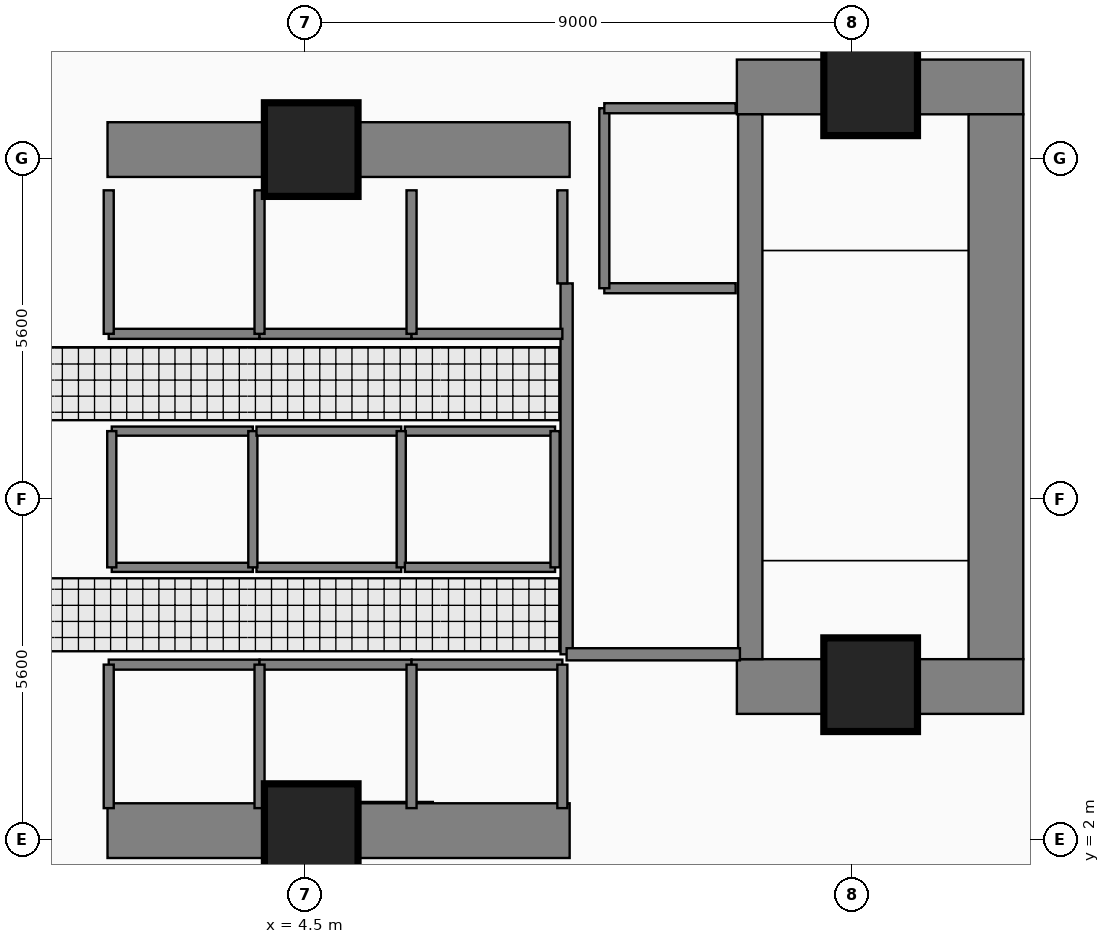
"""IFC4 building model, lengths in metres.
Left out: names, types, materials, properties, quantities, classifications, styles, units other than length and angle.
Written with IfcOpenShell. Run it as: python <this file> out.ifc"""

import sys

from ifc_helpers import new_model, si_unit, direction, frame, frame_2d, origin, origin_2d, place, context, subcontext, project, spatial, rectangle, extrude, element, fill, save


model = new_model("IFC4")
c1 = context("Model", 3, precision=1e-05, world=origin(), true_north=direction((0.0, 1.0)))
c2 = subcontext(c1, "Body", "Model", "MODEL_VIEW")
j1 = project(units=[si_unit("LENGTHUNIT", "METRE"), si_unit("PLANEANGLEUNIT", "RADIAN")], contexts=[c1])
p1 = place(None, origin())
s1 = spatial("IfcSite", under=j1, at=p1, CompositionType="ELEMENT")
p2 = place(p1, origin())
s2 = spatial("IfcBuilding", under=s1, at=p2, CompositionType="ELEMENT")
p3 = place(p2, origin())
s3 = spatial("IfcBuildingStorey", under=s2, at=p3, CompositionType="ELEMENT", Elevation=0.0)
p4 = place(p3, frame((11.6, 14.38, 0.0), z_axis=(0.0, 0.0, 1.0), x_axis=(1.0, 0.0, 0.0)))
e1 = element("IfcWall", 1, at=p4, inside=s3, PredefinedType="SHEAR", context=c2, shape_type="SweptSolid", body=[
    extrude(rectangle(XDim=4.71, YDim=0.9, at=frame_2d((2.355, 0.0))), origin(), (0.0, 0.0, 1.0), 5.81),
])
p5 = place(p3, frame((15.86, 4.97, 0.0), z_axis=(0.0, 0.0, 1.0), x_axis=(0.0, 1.0, 0.0)))
e2 = element("IfcWall", 2, at=p5, inside=s3, PredefinedType="SHEAR", context=c2, shape_type="SweptSolid", body=[
    extrude(rectangle(XDim=8.96, YDim=0.9, at=frame_2d((4.48, 0.0))), origin(), (0.0, 0.0, 1.0), 5.81),
])
p6 = place(p3, frame((11.6, 4.52, 0.0), z_axis=(0.0, 0.0, 1.0), x_axis=(1.0, 0.0, 0.0)))
e3 = element("IfcWall", 3, at=p6, inside=s3, PredefinedType="SHEAR", context=c2, shape_type="SweptSolid", body=[
    extrude(rectangle(XDim=4.71, YDim=0.9, at=frame_2d((2.355, 0.0))), origin(), (0.0, 0.0, 1.0), 5.81),
])
for number, where, z_axis, x_axis in (
    (4, (1.25, 2.15, 0.0), (0.0, 0.0, 1.0), (1.0, 0.0, 0.0)),
    (5, (1.25, 13.35, 0.0), (0.0, 0.0, 1.0), (1.0, 0.0, 0.0)),
):
    element("IfcWall", number, at=place(p3, frame(where, z_axis=z_axis, x_axis=x_axis)), inside=s3, PredefinedType="SHEAR", context=c2, shape_type="SweptSolid", body=[
        extrude(rectangle(XDim=7.6, YDim=0.9, at=frame_2d((3.8, 0.0))), origin(), (0.0, 0.0, 1.0), 5.75),
    ])
p7 = place(p3, frame((11.82, 13.93, 0.0), z_axis=(0.0, 0.0, 1.0), x_axis=(0.0, -1.0, 0.0)))
e6 = element("IfcWall", 6, at=p7, inside=s3, PredefinedType="SHEAR", context=c2, shape_type="SweptSolid", body=[
    extrude(rectangle(XDim=8.96, YDim=0.4, at=frame_2d((4.48, 0.0))), origin(), (0.0, 0.0, 1.0), 5.81),
])
p8 = place(p7, frame((7.53, 0.0, 0.0)))
e7 = element("IfcOpeningElement", 7, at=p8, cuts=e6, PredefinedType="OPENING", context=c2, shape_type="SweptSolid", body=[
    extrude(rectangle(XDim=1.12, YDim=2.22, at=frame_2d((0.56, 1.11))), frame((0.0, 0.21, 0.0), z_axis=(0.0, -1.0, 0.0), x_axis=(1.0, 0.0, 0.0)), (0.0, 0.0, 1.0), 0.42),
])
for number, where, z_axis, x_axis in (
    (8, (4.6, 13.35, 0.0), (0.0, 0.0, 1.0), (1.0, 0.0, 0.0)),
    (9, (13.8, 14.35, 0.0), (0.0, 0.0, 1.0), (1.0, 0.0, 0.0)),
    (10, (4.6, 2.15, 0.0), (0.0, 0.0, 1.0), (1.0, 0.0, 0.0)),
    (11, (13.8, 4.55, 0.0), (0.0, 0.0, 1.0), (1.0, 0.0, 0.0)),
):
    element("IfcColumn", number, at=place(p3, frame(where, z_axis=z_axis, x_axis=x_axis)), inside=s3, PredefinedType="COLUMN", context=c2, shape_type="SweptSolid", body=[
        extrude(rectangle(XDim=1.5, YDim=1.5, at=origin_2d()), origin(), (0.0, 0.0, 1.0), 6.0),
    ])
p9 = place(p3, frame((8.8, 11.15, 0.0), z_axis=(0.0, 0.0, 1.0), x_axis=(0.0, -1.0, 0.0)))
e12 = element("IfcWall", 12, at=p9, inside=s3, PredefinedType="PARTITIONING", context=c2, shape_type="SweptSolid", body=[
    extrude(rectangle(XDim=6.1, YDim=0.2, at=frame_2d((3.05, 0.0))), origin(), (0.0, 0.0, 1.0), 5.75),
])
p10 = place(p9, frame((1.15, 0.0, 0.0)))
e13 = element("IfcOpeningElement", 13, at=p10, cuts=e12, PredefinedType="OPENING", context=c2, shape_type="SweptSolid", body=[
    extrude(rectangle(XDim=1.1, YDim=2.2, at=frame_2d((0.55, 1.1))), frame((0.0, 0.11, 0.0), z_axis=(0.0, -1.0, 0.0), x_axis=(1.0, 0.0, 0.0)), (0.0, 0.0, 1.0), 0.22),
])
p11 = place(p9, frame((4.75, 0.0, 0.0)))
e14 = element("IfcOpeningElement", 14, at=p11, cuts=e12, PredefinedType="OPENING", context=c2, shape_type="SweptSolid", body=[
    extrude(rectangle(XDim=1.1, YDim=2.2, at=frame_2d((0.55, 1.1))), frame((0.0, 0.11, 0.0), z_axis=(0.0, -1.0, 0.0), x_axis=(1.0, 0.0, 0.0)), (0.0, 0.0, 1.0), 0.22),
])
p12 = place(p3, frame((9.42, 11.07, 0.0), z_axis=(0.0, 0.0, 1.0), x_axis=(1.0, 0.0, 0.0)))
e15 = element("IfcWall", 15, at=p12, inside=s3, PredefinedType="PARTITIONING", context=c2, shape_type="SweptSolid", body=[
    extrude(rectangle(XDim=2.16, YDim=0.165, at=frame_2d((1.08, 0.0))), origin(), (0.0, 0.0, 1.0), 5.75),
])
p13 = place(p12, frame((0.53, 0.0, 0.0)))
e16 = element("IfcOpeningElement", 16, at=p13, cuts=e15, PredefinedType="OPENING", context=c2, shape_type="SweptSolid", body=[
    extrude(rectangle(XDim=1.15, YDim=2.25, at=frame_2d((0.575, 1.125))), frame((0.0, 0.093, 0.0), z_axis=(0.0, -1.0, 0.0), x_axis=(1.0, 0.0, 0.0)), (0.0, 0.0, 1.0), 0.185),
])
p14 = place(p3, frame((1.27, 4.88, 0.0), z_axis=(0.0, 0.0, 1.0), x_axis=(1.0, 0.0, 0.0)))
e17 = element("IfcWall", 17, at=p14, inside=s3, PredefinedType="PARTITIONING", context=c2, shape_type="SweptSolid", body=[
    extrude(rectangle(XDim=2.48, YDim=0.165, at=frame_2d((1.24, 0.0))), origin(), (0.0, 0.0, 1.0), 5.75),
])
p15 = place(p14, frame((0.69, 0.0, 0.0)))
e18 = element("IfcOpeningElement", 18, at=p15, cuts=e17, PredefinedType="OPENING", context=c2, shape_type="SweptSolid", body=[
    extrude(rectangle(XDim=1.1, YDim=2.25, at=frame_2d((0.55, 1.125))), frame((0.0, 0.093, 0.0), z_axis=(0.0, -1.0, 0.0), x_axis=(1.0, 0.0, 0.0)), (0.0, 0.0, 1.0), 0.185),
])
p16 = place(p3, frame((1.27, 10.32, 0.0), z_axis=(0.0, 0.0, 1.0), x_axis=(1.0, 0.0, 0.0)))
e19 = element("IfcWall", 19, at=p16, inside=s3, PredefinedType="PARTITIONING", context=c2, shape_type="SweptSolid", body=[
    extrude(rectangle(XDim=2.48, YDim=0.165, at=frame_2d((1.24, 0.0))), origin(), (0.0, 0.0, 1.0), 5.75),
])
p17 = place(p16, frame((0.69, 0.0, 0.0)))
e20 = element("IfcOpeningElement", 20, at=p17, cuts=e19, PredefinedType="OPENING", context=c2, shape_type="SweptSolid", body=[
    extrude(rectangle(XDim=1.1, YDim=2.25, at=frame_2d((0.55, 1.125))), frame((0.0, 0.093, 0.0), z_axis=(0.0, -1.0, 0.0), x_axis=(1.0, 0.0, 0.0)), (0.0, 0.0, 1.0), 0.185),
])
p18 = place(p3, frame((3.75, 4.88, 0.0), z_axis=(0.0, 0.0, 1.0), x_axis=(1.0, 0.0, 0.0)))
e21 = element("IfcWall", 21, at=p18, inside=s3, PredefinedType="PARTITIONING", context=c2, shape_type="SweptSolid", body=[
    extrude(rectangle(XDim=2.5, YDim=0.165, at=frame_2d((1.25, 0.0))), origin(), (0.0, 0.0, 1.0), 5.75),
])
p19 = place(p18, frame((0.7, 0.0, 0.0)))
e22 = element("IfcOpeningElement", 22, at=p19, cuts=e21, PredefinedType="OPENING", context=c2, shape_type="SweptSolid", body=[
    extrude(rectangle(XDim=1.1, YDim=2.25, at=frame_2d((0.55, 1.125))), frame((0.0, 0.093, 0.0), z_axis=(0.0, -1.0, 0.0), x_axis=(1.0, 0.0, 0.0)), (0.0, 0.0, 1.0), 0.185),
])
p20 = place(p3, frame((6.25, 4.88, 0.0), z_axis=(0.0, 0.0, 1.0), x_axis=(1.0, 0.0, 0.0)))
e23 = element("IfcWall", 23, at=p20, inside=s3, PredefinedType="PARTITIONING", context=c2, shape_type="SweptSolid", body=[
    extrude(rectangle(XDim=2.48, YDim=0.165, at=frame_2d((1.24, 0.0))), origin(), (0.0, 0.0, 1.0), 5.75),
])
p21 = place(p20, frame((0.69, 0.0, 0.0)))
e24 = element("IfcOpeningElement", 24, at=p21, cuts=e23, PredefinedType="OPENING", context=c2, shape_type="SweptSolid", body=[
    extrude(rectangle(XDim=1.1, YDim=2.25, at=frame_2d((0.55, 1.125))), frame((0.0, 0.093, 0.0), z_axis=(0.0, -1.0, 0.0), x_axis=(1.0, 0.0, 0.0)), (0.0, 0.0, 1.0), 0.185),
])
p22 = place(p3, frame((3.75, 10.32, 0.0), z_axis=(0.0, 0.0, 1.0), x_axis=(1.0, 0.0, 0.0)))
e25 = element("IfcWall", 25, at=p22, inside=s3, PredefinedType="PARTITIONING", context=c2, shape_type="SweptSolid", body=[
    extrude(rectangle(XDim=2.5, YDim=0.165, at=frame_2d((1.25, 0.0))), origin(), (0.0, 0.0, 1.0), 5.75),
])
p23 = place(p22, frame((0.7, 0.0, 0.0)))
e26 = element("IfcOpeningElement", 26, at=p23, cuts=e25, PredefinedType="OPENING", context=c2, shape_type="SweptSolid", body=[
    extrude(rectangle(XDim=1.1, YDim=2.25, at=frame_2d((0.55, 1.125))), frame((0.0, 0.093, 0.0), z_axis=(0.0, -1.0, 0.0), x_axis=(1.0, 0.0, 0.0)), (0.0, 0.0, 1.0), 0.185),
])
p24 = place(p3, frame((6.25, 10.32, 0.0), z_axis=(0.0, 0.0, 1.0), x_axis=(1.0, 0.0, 0.0)))
e27 = element("IfcWall", 27, at=p24, inside=s3, PredefinedType="PARTITIONING", context=c2, shape_type="SweptSolid", body=[
    extrude(rectangle(XDim=2.48, YDim=0.165, at=frame_2d((1.24, 0.0))), origin(), (0.0, 0.0, 1.0), 5.75),
])
p25 = place(p24, frame((0.69, 0.0, 0.0)))
e28 = element("IfcOpeningElement", 28, at=p25, cuts=e27, PredefinedType="OPENING", context=c2, shape_type="SweptSolid", body=[
    extrude(rectangle(XDim=1.1, YDim=2.25, at=frame_2d((0.55, 1.125))), frame((0.0, 0.093, 0.0), z_axis=(0.0, -1.0, 0.0), x_axis=(1.0, 0.0, 0.0)), (0.0, 0.0, 1.0), 0.185),
])
p26 = place(p3, frame((1.32, 8.72, 0.0), z_axis=(0.0, 0.0, 1.0), x_axis=(1.0, 0.0, 0.0)))
e29 = element("IfcWall", 29, at=p26, inside=s3, PredefinedType="PARTITIONING", context=c2, shape_type="SweptSolid", body=[
    extrude(rectangle(XDim=2.32, YDim=0.15, at=frame_2d((1.16, 0.0))), origin(), (0.0, 0.0, 1.0), 5.75),
])
p27 = place(p26, frame((0.71, 0.0, 0.0)))
e30 = element("IfcOpeningElement", 30, at=p27, cuts=e29, PredefinedType="OPENING", context=c2, shape_type="SweptSolid", body=[
    extrude(rectangle(XDim=0.9, YDim=2.15, at=frame_2d((0.45, 1.075))), frame((0.0, 0.085, 0.0), z_axis=(0.0, -1.0, 0.0), x_axis=(1.0, 0.0, 0.0)), (0.0, 0.0, 1.0), 0.17),
])
p28 = place(p3, frame((3.7, 6.48, 0.0), z_axis=(0.0, 0.0, 1.0), x_axis=(1.0, 0.0, 0.0)))
e31 = element("IfcWall", 31, at=p28, inside=s3, PredefinedType="PARTITIONING", context=c2, shape_type="SweptSolid", body=[
    extrude(rectangle(XDim=2.38, YDim=0.15, at=frame_2d((1.19, 0.0))), origin(), (0.0, 0.0, 1.0), 5.75),
])
p29 = place(p28, frame((0.74, 0.0, 0.0)))
e32 = element("IfcOpeningElement", 32, at=p29, cuts=e31, PredefinedType="OPENING", context=c2, shape_type="SweptSolid", body=[
    extrude(rectangle(XDim=0.9, YDim=2.15, at=frame_2d((0.45, 1.075))), frame((0.0, 0.085, 0.0), z_axis=(0.0, -1.0, 0.0), x_axis=(1.0, 0.0, 0.0)), (0.0, 0.0, 1.0), 0.17),
])
p30 = place(p3, frame((6.14, 8.72, 0.0), z_axis=(0.0, 0.0, 1.0), x_axis=(1.0, 0.0, 0.0)))
e33 = element("IfcWall", 33, at=p30, inside=s3, PredefinedType="PARTITIONING", context=c2, shape_type="SweptSolid", body=[
    extrude(rectangle(XDim=2.47, YDim=0.15, at=frame_2d((1.235, 0.0))), origin(), (0.0, 0.0, 1.0), 5.75),
])
p31 = place(p30, frame((0.785, 0.0, 0.0)))
e34 = element("IfcOpeningElement", 34, at=p31, cuts=e33, PredefinedType="OPENING", context=c2, shape_type="SweptSolid", body=[
    extrude(rectangle(XDim=0.9, YDim=2.15, at=frame_2d((0.45, 1.075))), frame((0.0, 0.085, 0.0), z_axis=(0.0, -1.0, 0.0), x_axis=(1.0, 0.0, 0.0)), (0.0, 0.0, 1.0), 0.17),
])
p32 = place(p3, frame((8.8, 5.05, 0.0), z_axis=(0.0, 0.0, 1.0), x_axis=(1.0, 0.0, 0.0)))
e35 = element("IfcWall", 35, at=p32, inside=s3, PredefinedType="PARTITIONING", context=c2, shape_type="SweptSolid", body=[
    extrude(rectangle(XDim=2.85, YDim=0.2, at=frame_2d((1.425, 0.0))), origin(), (0.0, 0.0, 1.0), 5.75),
])
p33 = place(p3, frame((9.42, 11.07, 0.0), z_axis=(0.0, 0.0, 1.0), x_axis=(0.0, 1.0, 0.0)))
e36 = element("IfcWall", 36, at=p33, inside=s3, PredefinedType="PARTITIONING", context=c2, shape_type="SweptSolid", body=[
    extrude(rectangle(XDim=2.96, YDim=0.165, at=frame_2d((1.48, 0.0))), origin(), (0.0, 0.0, 1.0), 5.75),
])
p34 = place(p3, frame((9.42, 14.03, 0.0), z_axis=(0.0, 0.0, 1.0), x_axis=(1.0, 0.0, 0.0)))
e37 = element("IfcWall", 37, at=p34, inside=s3, PredefinedType="PARTITIONING", context=c2, shape_type="SweptSolid", body=[
    extrude(rectangle(XDim=2.16, YDim=0.165, at=frame_2d((1.08, 0.0))), origin(), (0.0, 0.0, 1.0), 5.75),
])
for number, where, z_axis, x_axis in (
    (38, (1.27, 2.52, 0.0), (0.0, 0.0, 1.0), (0.0, 1.0, 0.0)),
    (39, (3.75, 2.52, 0.0), (0.0, 0.0, 1.0), (0.0, 1.0, 0.0)),
    (40, (1.27, 10.32, 0.0), (0.0, 0.0, 1.0), (0.0, 1.0, 0.0)),
    (41, (3.75, 10.32, 0.0), (0.0, 0.0, 1.0), (0.0, 1.0, 0.0)),
    (42, (6.25, 2.52, 0.0), (0.0, 0.0, 1.0), (0.0, 1.0, 0.0)),
    (43, (8.73, 2.52, 0.0), (0.0, 0.0, 1.0), (0.0, 1.0, 0.0)),
    (44, (6.25, 10.32, 0.0), (0.0, 0.0, 1.0), (0.0, 1.0, 0.0)),
):
    element("IfcWall", number, at=place(p3, frame(where, z_axis=z_axis, x_axis=x_axis)), inside=s3, PredefinedType="PARTITIONING", context=c2, shape_type="SweptSolid", body=[
        extrude(rectangle(XDim=2.36, YDim=0.165, at=frame_2d((1.18, 0.0))), origin(), (0.0, 0.0, 1.0), 5.75),
    ])
p35 = place(p3, frame((8.73, 11.15, 0.0), z_axis=(0.0, 0.0, 1.0), x_axis=(0.0, 1.0, 0.0)))
e45 = element("IfcWall", 45, at=p35, inside=s3, PredefinedType="PARTITIONING", context=c2, shape_type="SweptSolid", body=[
    extrude(rectangle(XDim=1.53, YDim=0.165, at=frame_2d((0.765, 0.0))), origin(), (0.0, 0.0, 1.0), 5.75),
])
p36 = place(p3, frame((1.32, 6.48, 0.0), z_axis=(0.0, 0.0, 1.0), x_axis=(1.0, 0.0, 0.0)))
e46 = element("IfcWall", 46, at=p36, inside=s3, PredefinedType="PARTITIONING", context=c2, shape_type="SweptSolid", body=[
    extrude(rectangle(XDim=2.32, YDim=0.15, at=frame_2d((1.16, 0.0))), origin(), (0.0, 0.0, 1.0), 5.75),
])
for number, where, z_axis, x_axis in (
    (47, (1.32, 6.48, 0.0), (0.0, 0.0, 1.0), (0.0, 1.0, 0.0)),
    (48, (3.64, 6.48, 0.0), (0.0, 0.0, 1.0), (0.0, 1.0, 0.0)),
):
    element("IfcWall", number, at=place(p3, frame(where, z_axis=z_axis, x_axis=x_axis)), inside=s3, PredefinedType="PARTITIONING", context=c2, shape_type="SweptSolid", body=[
        extrude(rectangle(XDim=2.24, YDim=0.15, at=frame_2d((1.12, 0.0))), origin(), (0.0, 0.0, 1.0), 5.75),
    ])
p37 = place(p3, frame((3.7, 8.72, 0.0), z_axis=(0.0, 0.0, 1.0), x_axis=(1.0, 0.0, 0.0)))
e49 = element("IfcWall", 49, at=p37, inside=s3, PredefinedType="PARTITIONING", context=c2, shape_type="SweptSolid", body=[
    extrude(rectangle(XDim=2.38, YDim=0.15, at=frame_2d((1.19, 0.0))), origin(), (0.0, 0.0, 1.0), 5.75),
])
p38 = place(p3, frame((6.08, 6.48, 0.0), z_axis=(0.0, 0.0, 1.0), x_axis=(0.0, 1.0, 0.0)))
e50 = element("IfcWall", 50, at=p38, inside=s3, PredefinedType="PARTITIONING", context=c2, shape_type="SweptSolid", body=[
    extrude(rectangle(XDim=2.24, YDim=0.15, at=frame_2d((1.12, 0.0))), origin(), (0.0, 0.0, 1.0), 5.75),
])
p39 = place(p3, frame((6.14, 6.48, 0.0), z_axis=(0.0, 0.0, 1.0), x_axis=(1.0, 0.0, 0.0)))
e51 = element("IfcWall", 51, at=p39, inside=s3, PredefinedType="PARTITIONING", context=c2, shape_type="SweptSolid", body=[
    extrude(rectangle(XDim=2.47, YDim=0.15, at=frame_2d((1.235, 0.0))), origin(), (0.0, 0.0, 1.0), 5.75),
])
p40 = place(p3, frame((8.61, 6.48, 0.0), z_axis=(0.0, 0.0, 1.0), x_axis=(0.0, 1.0, 0.0)))
e52 = element("IfcWall", 52, at=p40, inside=s3, PredefinedType="PARTITIONING", context=c2, shape_type="SweptSolid", body=[
    extrude(rectangle(XDim=2.24, YDim=0.15, at=frame_2d((1.12, 0.0))), origin(), (0.0, 0.0, 1.0), 5.75),
])
p41 = place(p8, origin())
e53 = element("IfcDoor", 53, at=p41, inside=s3, OperationType="SINGLE_SWING_RIGHT", PredefinedType="DOOR", context=c2, shape_type="SweptSolid", body=[
    extrude(rectangle(XDim=1.12, YDim=2.22, at=frame_2d((0.56, 1.11))), frame((0.0, 0.025, 0.0), z_axis=(0.0, -1.0, 0.0), x_axis=(1.0, 0.0, 0.0)), (0.0, 0.0, 1.0), 0.05),
])
fill(e7, e53)
p42 = place(p10, origin())
e54 = element("IfcDoor", 54, at=p42, inside=s3, OperationType="SINGLE_SWING_RIGHT", PredefinedType="DOOR", context=c2, shape_type="SweptSolid", body=[
    extrude(rectangle(XDim=1.1, YDim=2.2, at=frame_2d((0.55, 1.1))), frame((0.0, 0.025, 0.0), z_axis=(0.0, -1.0, 0.0), x_axis=(1.0, 0.0, 0.0)), (0.0, 0.0, 1.0), 0.05),
])
fill(e13, e54)
p43 = place(p11, origin())
e55 = element("IfcDoor", 55, at=p43, inside=s3, OperationType="SINGLE_SWING_LEFT", PredefinedType="DOOR", context=c2, shape_type="SweptSolid", body=[
    extrude(rectangle(XDim=1.1, YDim=2.2, at=frame_2d((0.55, 1.1))), frame((0.0, 0.025, 0.0), z_axis=(0.0, -1.0, 0.0), x_axis=(1.0, 0.0, 0.0)), (0.0, 0.0, 1.0), 0.05),
])
fill(e14, e55)
p44 = place(p13, origin())
e56 = element("IfcDoor", 56, at=p44, inside=s3, OperationType="SLIDING_TO_LEFT", PredefinedType="DOOR", context=c2, shape_type="SweptSolid", body=[
    extrude(rectangle(XDim=1.15, YDim=2.25, at=frame_2d((0.575, 1.125))), frame((0.0, 0.025, 0.0), z_axis=(0.0, -1.0, 0.0), x_axis=(1.0, 0.0, 0.0)), (0.0, 0.0, 1.0), 0.05),
])
fill(e16, e56)
p45 = place(p15, origin())
e57 = element("IfcDoor", 57, at=p45, inside=s3, OperationType="SLIDING_TO_LEFT", PredefinedType="DOOR", context=c2, shape_type="SweptSolid", body=[
    extrude(rectangle(XDim=1.1, YDim=2.25, at=frame_2d((0.55, 1.125))), frame((0.0, 0.025, 0.0), z_axis=(0.0, -1.0, 0.0), x_axis=(1.0, 0.0, 0.0)), (0.0, 0.0, 1.0), 0.05),
])
fill(e18, e57)
p46 = place(p17, origin())
e58 = element("IfcDoor", 58, at=p46, inside=s3, OperationType="SLIDING_TO_LEFT", PredefinedType="DOOR", context=c2, shape_type="SweptSolid", body=[
    extrude(rectangle(XDim=1.1, YDim=2.25, at=frame_2d((0.55, 1.125))), frame((0.0, 0.025, 0.0), z_axis=(0.0, -1.0, 0.0), x_axis=(1.0, 0.0, 0.0)), (0.0, 0.0, 1.0), 0.05),
])
fill(e20, e58)
p47 = place(p19, origin())
e59 = element("IfcDoor", 59, at=p47, inside=s3, OperationType="SLIDING_TO_LEFT", PredefinedType="DOOR", context=c2, shape_type="SweptSolid", body=[
    extrude(rectangle(XDim=1.1, YDim=2.25, at=frame_2d((0.55, 1.125))), frame((0.0, 0.025, 0.0), z_axis=(0.0, -1.0, 0.0), x_axis=(1.0, 0.0, 0.0)), (0.0, 0.0, 1.0), 0.05),
])
fill(e22, e59)
p48 = place(p21, origin())
e60 = element("IfcDoor", 60, at=p48, inside=s3, OperationType="SLIDING_TO_LEFT", PredefinedType="DOOR", context=c2, shape_type="SweptSolid", body=[
    extrude(rectangle(XDim=1.1, YDim=2.25, at=frame_2d((0.55, 1.125))), frame((0.0, 0.025, 0.0), z_axis=(0.0, -1.0, 0.0), x_axis=(1.0, 0.0, 0.0)), (0.0, 0.0, 1.0), 0.05),
])
fill(e24, e60)
p49 = place(p23, origin())
e61 = element("IfcDoor", 61, at=p49, inside=s3, OperationType="SLIDING_TO_LEFT", PredefinedType="DOOR", context=c2, shape_type="SweptSolid", body=[
    extrude(rectangle(XDim=1.1, YDim=2.25, at=frame_2d((0.55, 1.125))), frame((0.0, 0.025, 0.0), z_axis=(0.0, -1.0, 0.0), x_axis=(1.0, 0.0, 0.0)), (0.0, 0.0, 1.0), 0.05),
])
fill(e26, e61)
p50 = place(p25, origin())
e62 = element("IfcDoor", 62, at=p50, inside=s3, OperationType="SLIDING_TO_LEFT", PredefinedType="DOOR", context=c2, shape_type="SweptSolid", body=[
    extrude(rectangle(XDim=1.1, YDim=2.25, at=frame_2d((0.55, 1.125))), frame((0.0, 0.025, 0.0), z_axis=(0.0, -1.0, 0.0), x_axis=(1.0, 0.0, 0.0)), (0.0, 0.0, 1.0), 0.05),
])
fill(e28, e62)
p51 = place(p27, origin())
e63 = element("IfcDoor", 63, at=p51, inside=s3, OperationType="SINGLE_SWING_LEFT", PredefinedType="DOOR", context=c2, shape_type="SweptSolid", body=[
    extrude(rectangle(XDim=0.9, YDim=2.15, at=frame_2d((0.45, 1.075))), frame((0.0, 0.025, 0.0), z_axis=(0.0, -1.0, 0.0), x_axis=(1.0, 0.0, 0.0)), (0.0, 0.0, 1.0), 0.05),
])
fill(e30, e63)
p52 = place(p29, origin())
e64 = element("IfcDoor", 64, at=p52, inside=s3, OperationType="SINGLE_SWING_RIGHT", PredefinedType="DOOR", context=c2, shape_type="SweptSolid", body=[
    extrude(rectangle(XDim=0.9, YDim=2.15, at=frame_2d((0.45, 1.075))), frame((0.0, 0.025, 0.0), z_axis=(0.0, -1.0, 0.0), x_axis=(1.0, 0.0, 0.0)), (0.0, 0.0, 1.0), 0.05),
])
fill(e32, e64)
p53 = place(p31, origin())
e65 = element("IfcDoor", 65, at=p53, inside=s3, OperationType="SINGLE_SWING_LEFT", PredefinedType="DOOR", context=c2, shape_type="SweptSolid", body=[
    extrude(rectangle(XDim=0.9, YDim=2.15, at=frame_2d((0.45, 1.075))), frame((0.0, 0.025, 0.0), z_axis=(0.0, -1.0, 0.0), x_axis=(1.0, 0.0, 0.0)), (0.0, 0.0, 1.0), 0.05),
])
fill(e34, e65)
save(model, sys.argv[1])
